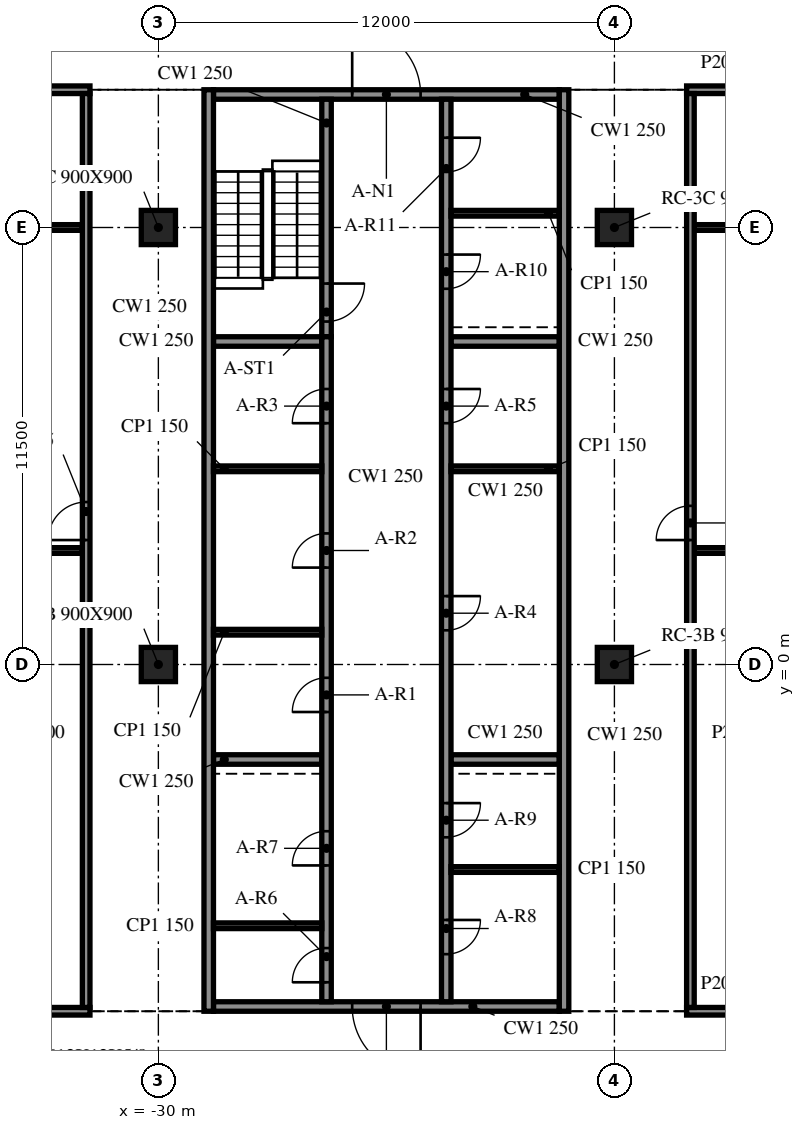
"""IFC4 building model, lengths in metres.
Left out: names, types, materials, properties, quantities, classifications, styles, units other than length and angle.
Written with IfcOpenShell. Run it as: python <this file> out.ifc"""

import sys

from ifc_helpers import new_model, si_unit, direction, frame, frame_2d, origin, origin_2d, place, context, subcontext, project, spatial, rectangle, extrude, element, fill, save


model = new_model("IFC4")
c1 = context("Model", 3, precision=1e-05, world=origin(), true_north=direction((0.0, 1.0)))
c2 = subcontext(c1, "Body", "Model", "MODEL_VIEW")
j1 = project(units=[si_unit("LENGTHUNIT", "METRE"), si_unit("PLANEANGLEUNIT", "RADIAN")], contexts=[c1])
p1 = place(None, origin())
s1 = spatial("IfcSite", under=j1, at=p1, CompositionType="ELEMENT")
p2 = place(p1, origin())
s2 = spatial("IfcBuilding", under=s1, at=p2, CompositionType="ELEMENT")
p3 = place(p2, frame((0.0, 0.0, 267.1)))
s3 = spatial("IfcBuildingStorey", under=s2, at=p3, CompositionType="ELEMENT", Elevation=267.1)
for number, where, z_axis, x_axis in (
    (1, (-30.0, 0.0, -0.34), (0.0, 0.0, 1.0), (1.0, 0.0, 0.0)),
    (2, (-30.0, 11.5, -0.34), (0.0, 0.0, 1.0), (1.0, 0.0, 0.0)),
    (3, (-18.0, 0.0, -0.34), (0.0, 0.0, 1.0), (1.0, 0.0, 0.0)),
    (4, (-18.0, 11.5, -0.34), (0.0, 0.0, 1.0), (1.0, 0.0, 0.0)),
):
    element("IfcColumn", number, at=place(p3, frame(where, z_axis=z_axis, x_axis=x_axis)), inside=s3, PredefinedType="COLUMN", context=c2, shape_type="SweptSolid", body=[
        extrude(rectangle(XDim=0.9, YDim=0.9, at=origin_2d()), origin(), (0.0, 0.0, 1.0), 3.8),
    ])
for number, where, z_axis, x_axis in (
    (5, (-28.675, 15.125, 0.0), (0.0, 0.0, 1.0), (0.0, -1.0, 0.0)),
    (6, (-19.325, -9.125, 0.0), (0.0, 0.0, 1.0), (0.0, 1.0, 0.0)),
):
    element("IfcWall", number, at=place(p3, frame(where, z_axis=z_axis, x_axis=x_axis)), inside=s3, PredefinedType="SOLIDWALL", context=c2, shape_type="SweptSolid", body=[
        extrude(rectangle(XDim=24.25, YDim=0.25, at=frame_2d((12.125, 0.0))), origin(), (0.0, 0.0, 1.0), 3.46),
    ])
p4 = place(p3, frame((-19.45, -9.0, 0.0), z_axis=(0.0, 0.0, 1.0), x_axis=(-1.0, 0.0, 0.0)))
e7 = element("IfcWall", 7, at=p4, inside=s3, PredefinedType="SOLIDWALL", context=c2, shape_type="SweptSolid", body=[
    extrude(rectangle(XDim=9.1, YDim=0.25, at=frame_2d((4.55, 0.0))), origin(), (0.0, 0.0, 1.0), 3.46),
])
p5 = place(p4, frame((3.65, 0.0, 0.0)))
e8 = element("IfcOpeningElement", 8, at=p5, cuts=e7, PredefinedType="OPENING", context=c2, shape_type="SweptSolid", body=[
    extrude(rectangle(XDim=1.8, YDim=2.1, at=frame_2d((0.9, 1.05))), frame((0.0, 0.135, 0.0), z_axis=(0.0, -1.0, 0.0), x_axis=(1.0, 0.0, 0.0)), (0.0, 0.0, 1.0), 0.27),
])
p6 = place(p3, frame((-28.55, 15.0, 0.0), z_axis=(0.0, 0.0, 1.0), x_axis=(1.0, 0.0, 0.0)))
e9 = element("IfcWall", 9, at=p6, inside=s3, PredefinedType="SOLIDWALL", context=c2, shape_type="SweptSolid", body=[
    extrude(rectangle(XDim=9.1, YDim=0.25, at=frame_2d((4.55, 0.0))), origin(), (0.0, 0.0, 1.0), 3.46),
])
p7 = place(p6, frame((3.65, 0.0, 0.0)))
e10 = element("IfcOpeningElement", 10, at=p7, cuts=e9, PredefinedType="OPENING", context=c2, shape_type="SweptSolid", body=[
    extrude(rectangle(XDim=1.8, YDim=2.1, at=frame_2d((0.9, 1.05))), frame((0.0, 0.135, 0.0), z_axis=(0.0, -1.0, 0.0), x_axis=(1.0, 0.0, 0.0)), (0.0, 0.0, 1.0), 0.27),
])
p8 = place(p3, frame((-25.575, -8.875, 0.0), z_axis=(0.0, 0.0, 1.0), x_axis=(0.0, 1.0, 0.0)))
e11 = element("IfcWall", 11, at=p8, inside=s3, PredefinedType="SOLIDWALL", context=c2, shape_type="SweptSolid", body=[
    extrude(rectangle(XDim=17.5, YDim=0.25, at=frame_2d((8.75, 0.0))), origin(), (0.0, 0.0, 1.0), 3.46),
])
p9 = place(p8, frame((7.625, 0.0, 0.0)))
e12 = element("IfcOpeningElement", 12, at=p9, cuts=e11, PredefinedType="OPENING", context=c2, shape_type="SweptSolid", body=[
    extrude(rectangle(XDim=0.9, YDim=2.1, at=frame_2d((0.45, 1.05))), frame((0.0, 0.135, 0.0), z_axis=(0.0, -1.0, 0.0), x_axis=(1.0, 0.0, 0.0)), (0.0, 0.0, 1.0), 0.27),
])
p10 = place(p8, frame((11.425, 0.0, 0.0)))
e13 = element("IfcOpeningElement", 13, at=p10, cuts=e11, PredefinedType="OPENING", context=c2, shape_type="SweptSolid", body=[
    extrude(rectangle(XDim=0.9, YDim=2.1, at=frame_2d((0.45, 1.05))), frame((0.0, 0.135, 0.0), z_axis=(0.0, -1.0, 0.0), x_axis=(1.0, 0.0, 0.0)), (0.0, 0.0, 1.0), 0.27),
])
p11 = place(p8, frame((15.225, 0.0, 0.0)))
e14 = element("IfcOpeningElement", 14, at=p11, cuts=e11, PredefinedType="OPENING", context=c2, shape_type="SweptSolid", body=[
    extrude(rectangle(XDim=0.9, YDim=2.1, at=frame_2d((0.45, 1.05))), frame((0.0, 0.135, 0.0), z_axis=(0.0, -1.0, 0.0), x_axis=(1.0, 0.0, 0.0)), (0.0, 0.0, 1.0), 0.27),
])
p12 = place(p8, frame((0.512, 0.0, 0.0)))
e15 = element("IfcOpeningElement", 15, at=p12, cuts=e11, PredefinedType="OPENING", context=c2, shape_type="SweptSolid", body=[
    extrude(rectangle(XDim=0.9, YDim=2.1, at=frame_2d((0.45, 1.05))), frame((0.0, 0.135, 0.0), z_axis=(0.0, -1.0, 0.0), x_axis=(1.0, 0.0, 0.0)), (0.0, 0.0, 1.0), 0.27),
])
p13 = place(p8, frame((3.587, 0.0, 0.0)))
e16 = element("IfcOpeningElement", 16, at=p13, cuts=e11, PredefinedType="OPENING", context=c2, shape_type="SweptSolid", body=[
    extrude(rectangle(XDim=0.9, YDim=2.1, at=frame_2d((0.45, 1.05))), frame((0.0, 0.135, 0.0), z_axis=(0.0, -1.0, 0.0), x_axis=(1.0, 0.0, 0.0)), (0.0, 0.0, 1.0), 0.27),
])
p14 = place(p3, frame((-25.575, 14.875, 0.0), z_axis=(0.0, 0.0, 1.0), x_axis=(0.0, -1.0, 0.0)))
e17 = element("IfcWall", 17, at=p14, inside=s3, PredefinedType="SOLIDWALL", context=c2, shape_type="SweptSolid", body=[
    extrude(rectangle(XDim=6.25, YDim=0.25, at=frame_2d((3.125, 0.0))), origin(), (0.0, 0.0, 1.0), 3.46),
])
p15 = place(p14, frame((4.85, 0.0, 0.0)))
e18 = element("IfcOpeningElement", 18, at=p15, cuts=e17, PredefinedType="OPENING", context=c2, shape_type="SweptSolid", body=[
    extrude(rectangle(XDim=1.0, YDim=2.1, at=frame_2d((0.5, 1.05))), frame((0.0, 0.135, 0.0), z_axis=(0.0, -1.0, 0.0), x_axis=(1.0, 0.0, 0.0)), (0.0, 0.0, 1.0), 0.27),
])
p16 = place(p3, frame((-22.425, 14.875, 0.0), z_axis=(0.0, 0.0, 1.0), x_axis=(0.0, -1.0, 0.0)))
e19 = element("IfcWall", 19, at=p16, inside=s3, PredefinedType="SOLIDWALL", context=c2, shape_type="SweptSolid", body=[
    extrude(rectangle(XDim=23.75, YDim=0.25, at=frame_2d((11.875, 0.0))), origin(), (0.0, 0.0, 1.0), 3.46),
])
p17 = place(p16, frame((13.075, 0.0, 0.0)))
e20 = element("IfcOpeningElement", 20, at=p17, cuts=e19, PredefinedType="OPENING", context=c2, shape_type="SweptSolid", body=[
    extrude(rectangle(XDim=0.9, YDim=2.1, at=frame_2d((0.45, 1.05))), frame((0.0, 0.135, 0.0), z_axis=(0.0, -1.0, 0.0), x_axis=(1.0, 0.0, 0.0)), (0.0, 0.0, 1.0), 0.27),
])
p18 = place(p16, frame((7.625, 0.0, 0.0)))
e21 = element("IfcOpeningElement", 21, at=p18, cuts=e19, PredefinedType="OPENING", context=c2, shape_type="SweptSolid", body=[
    extrude(rectangle(XDim=0.9, YDim=2.1, at=frame_2d((0.45, 1.05))), frame((0.0, 0.135, 0.0), z_axis=(0.0, -1.0, 0.0), x_axis=(1.0, 0.0, 0.0)), (0.0, 0.0, 1.0), 0.27),
])
p19 = place(p16, frame((21.597, 0.0, 0.0)))
e22 = element("IfcOpeningElement", 22, at=p19, cuts=e19, PredefinedType="OPENING", context=c2, shape_type="SweptSolid", body=[
    extrude(rectangle(XDim=0.9, YDim=2.1, at=frame_2d((0.45, 1.05))), frame((0.0, 0.135, 0.0), z_axis=(0.0, -1.0, 0.0), x_axis=(1.0, 0.0, 0.0)), (0.0, 0.0, 1.0), 0.27),
])
p20 = place(p16, frame((18.522, 0.0, 0.0)))
e23 = element("IfcOpeningElement", 23, at=p20, cuts=e19, PredefinedType="OPENING", context=c2, shape_type="SweptSolid", body=[
    extrude(rectangle(XDim=0.9, YDim=2.1, at=frame_2d((0.45, 1.05))), frame((0.0, 0.135, 0.0), z_axis=(0.0, -1.0, 0.0), x_axis=(1.0, 0.0, 0.0)), (0.0, 0.0, 1.0), 0.27),
])
p21 = place(p16, frame((4.087, 0.0, 0.0)))
e24 = element("IfcOpeningElement", 24, at=p21, cuts=e19, PredefinedType="OPENING", context=c2, shape_type="SweptSolid", body=[
    extrude(rectangle(XDim=0.9, YDim=2.1, at=frame_2d((0.45, 1.05))), frame((0.0, 0.135, 0.0), z_axis=(0.0, -1.0, 0.0), x_axis=(1.0, 0.0, 0.0)), (0.0, 0.0, 1.0), 0.27),
])
p22 = place(p16, frame((1.012, 0.0, 0.0)))
e25 = element("IfcOpeningElement", 25, at=p22, cuts=e19, PredefinedType="OPENING", context=c2, shape_type="SweptSolid", body=[
    extrude(rectangle(XDim=0.9, YDim=2.1, at=frame_2d((0.45, 1.05))), frame((0.0, 0.135, 0.0), z_axis=(0.0, -1.0, 0.0), x_axis=(1.0, 0.0, 0.0)), (0.0, 0.0, 1.0), 0.27),
])
for number, where, z_axis, x_axis in (
    (26, (-28.55, -2.5, 0.0), (0.0, 0.0, 1.0), (1.0, 0.0, 0.0)),
    (27, (-28.55, 8.5, 0.0), (0.0, 0.0, 1.0), (1.0, 0.0, 0.0)),
    (28, (-22.3, -2.5, 0.0), (0.0, 0.0, 1.0), (1.0, 0.0, 0.0)),
    (29, (-22.3, 8.5, 0.0), (0.0, 0.0, 1.0), (1.0, 0.0, 0.0)),
):
    element("IfcWall", number, at=place(p3, frame(where, z_axis=z_axis, x_axis=x_axis)), inside=s3, PredefinedType="SOLIDWALL", context=c2, shape_type="SweptSolid", body=[
        extrude(rectangle(XDim=2.85, YDim=0.25, at=frame_2d((1.425, 0.0))), origin(), (0.0, 0.0, 1.0), 3.46),
    ])
for number, where, z_axis, x_axis in (
    (30, (-28.55, 0.85, 0.0), (0.0, 0.0, 1.0), (1.0, 0.0, 0.0)),
    (31, (-28.55, 5.15, 0.0), (0.0, 0.0, 1.0), (1.0, 0.0, 0.0)),
    (32, (-22.3, 5.15, 0.0), (0.0, 0.0, 1.0), (1.0, 0.0, 0.0)),
    (33, (-28.55, -6.875, 0.0), (0.0, 0.0, 1.0), (1.0, 0.0, 0.0)),
    (34, (-22.3, -5.395, 0.0), (0.0, 0.0, 1.0), (1.0, 0.0, 0.0)),
    (35, (-22.3, 11.875, 0.0), (0.0, 0.0, 1.0), (1.0, 0.0, 0.0)),
):
    element("IfcWall", number, at=place(p3, frame(where, z_axis=z_axis, x_axis=x_axis)), inside=s3, PredefinedType="PARTITIONING", context=c2, shape_type="SweptSolid", body=[
        extrude(rectangle(XDim=2.85, YDim=0.15, at=frame_2d((1.425, 0.0))), origin(), (0.0, 0.0, 1.0), 3.46),
    ])
p23 = place(p3, frame((-47.574, -9.125, 0.0), z_axis=(0.0, 0.0, 1.0), x_axis=(1.0, 0.0, 0.0)))
e36 = element("IfcWall", 36, at=p23, inside=s3, PredefinedType="PARTITIONING", context=c2, shape_type="SweptSolid", body=[
    extrude(rectangle(XDim=15.774, YDim=0.2, at=frame_2d((7.887, 0.0))), origin(), (0.0, 0.0, 1.0), 3.46),
])
p24 = place(p23, frame((7.3, 0.0, 0.0)))
e37 = element("IfcOpeningElement", 37, at=p24, cuts=e36, PredefinedType="OPENING", context=c2, shape_type="SweptSolid", body=[
    extrude(rectangle(XDim=1.0, YDim=2.1, at=frame_2d((0.5, 1.05))), frame((0.0, 0.11, 0.0), z_axis=(0.0, -1.0, 0.0), x_axis=(1.0, 0.0, 0.0)), (0.0, 0.0, 1.0), 0.22),
])
p25 = place(p3, frame((-16.1, -9.125, 0.0), z_axis=(0.0, 0.0, 1.0), x_axis=(1.0, 0.0, 0.0)))
e38 = element("IfcWall", 38, at=p25, inside=s3, PredefinedType="PARTITIONING", context=c2, shape_type="SweptSolid", body=[
    extrude(rectangle(XDim=8.1, YDim=0.2, at=frame_2d((4.05, 0.0))), origin(), (0.0, 0.0, 1.0), 3.46),
])
p26 = place(p25, frame((3.5, 0.0, 0.0)))
e39 = element("IfcOpeningElement", 39, at=p26, cuts=e38, PredefinedType="OPENING", context=c2, shape_type="SweptSolid", body=[
    extrude(rectangle(XDim=1.0, YDim=2.1, at=frame_2d((0.5, 1.05))), frame((0.0, 0.11, 0.0), z_axis=(0.0, -1.0, 0.0), x_axis=(1.0, 0.0, 0.0)), (0.0, 0.0, 1.0), 0.22),
])
p27 = place(p3, frame((-47.85, 3.0, 0.0), z_axis=(0.0, 0.0, 1.0), x_axis=(1.0, 0.0, 0.0)))
e40 = element("IfcWall", 40, at=p27, inside=s3, PredefinedType="PARTITIONING", context=c2, shape_type="SweptSolid", body=[
    extrude(rectangle(XDim=15.85, YDim=0.15, at=frame_2d((7.925, 0.0))), origin(), (0.0, 0.0, 1.0), 3.46),
])
p28 = place(p3, frame((-15.9, 3.0, 0.0), z_axis=(0.0, 0.0, 1.0), x_axis=(1.0, 0.0, 0.0)))
e41 = element("IfcWall", 41, at=p28, inside=s3, PredefinedType="PARTITIONING", context=c2, shape_type="SweptSolid", body=[
    extrude(rectangle(XDim=7.7, YDim=0.15, at=frame_2d((3.85, 0.0))), origin(), (0.0, 0.0, 1.0), 3.46),
])
p29 = place(p3, frame((-41.55, 11.5, 0.0), z_axis=(0.0, 0.0, 1.0), x_axis=(1.0, 0.0, 0.0)))
e42 = element("IfcWall", 42, at=p29, inside=s3, PredefinedType="PARTITIONING", context=c2, shape_type="SweptSolid", body=[
    extrude(rectangle(XDim=9.55, YDim=0.15, at=frame_2d((4.775, 0.0))), origin(), (0.0, 0.0, 1.0), 3.46),
])
p30 = place(p3, frame((-15.9, 11.5, 0.0), z_axis=(0.0, 0.0, 1.0), x_axis=(1.0, 0.0, 0.0)))
e43 = element("IfcWall", 43, at=p30, inside=s3, PredefinedType="PARTITIONING", context=c2, shape_type="SweptSolid", body=[
    extrude(rectangle(XDim=7.7, YDim=0.15, at=frame_2d((3.85, 0.0))), origin(), (0.0, 0.0, 1.0), 3.46),
])
p31 = place(p3, frame((-47.975, 15.125, 0.0), z_axis=(0.0, 0.0, 1.0), x_axis=(1.0, 0.0, 0.0)))
e44 = element("IfcWall", 44, at=p31, inside=s3, PredefinedType="PARTITIONING", context=c2, shape_type="SweptSolid", body=[
    extrude(rectangle(XDim=16.175, YDim=0.2, at=frame_2d((8.087, 0.0))), origin(), (0.0, 0.0, 1.0), 3.46),
])
p32 = place(p31, frame((7.5, 0.0, 0.0)))
e45 = element("IfcOpeningElement", 45, at=p32, cuts=e44, PredefinedType="OPENING", context=c2, shape_type="SweptSolid", body=[
    extrude(rectangle(XDim=1.0, YDim=2.1, at=frame_2d((0.5, 1.05))), frame((0.0, 0.11, 0.0), z_axis=(0.0, -1.0, 0.0), x_axis=(1.0, 0.0, 0.0)), (0.0, 0.0, 1.0), 0.22),
])
p33 = place(p3, frame((-16.1, 15.125, 0.0), z_axis=(0.0, 0.0, 1.0), x_axis=(1.0, 0.0, 0.0)))
e46 = element("IfcWall", 46, at=p33, inside=s3, PredefinedType="PARTITIONING", context=c2, shape_type="SweptSolid", body=[
    extrude(rectangle(XDim=8.1, YDim=0.2, at=frame_2d((4.05, 0.0))), origin(), (0.0, 0.0, 1.0), 3.46),
])
p34 = place(p33, frame((3.5, 0.0, 0.0)))
e47 = element("IfcOpeningElement", 47, at=p34, cuts=e46, PredefinedType="OPENING", context=c2, shape_type="SweptSolid", body=[
    extrude(rectangle(XDim=1.0, YDim=2.1, at=frame_2d((0.5, 1.05))), frame((0.0, 0.11, 0.0), z_axis=(0.0, -1.0, 0.0), x_axis=(1.0, 0.0, 0.0)), (0.0, 0.0, 1.0), 0.22),
])
p35 = place(p3, frame((-31.9, -9.025, 0.0), z_axis=(0.0, 0.0, 1.0), x_axis=(0.0, 1.0, 0.0)))
e48 = element("IfcWall", 48, at=p35, inside=s3, PredefinedType="PARTITIONING", context=c2, shape_type="SweptSolid", body=[
    extrude(rectangle(XDim=24.05, YDim=0.2, at=frame_2d((12.025, 0.0))), origin(), (0.0, 0.0, 1.0), 3.46),
])
p36 = place(p35, frame((12.3, 0.0, 0.0)))
e49 = element("IfcOpeningElement", 49, at=p36, cuts=e48, PredefinedType="OPENING", context=c2, shape_type="SweptSolid", body=[
    extrude(rectangle(XDim=1.0, YDim=2.1, at=frame_2d((0.5, 1.05))), frame((0.0, 0.11, 0.0), z_axis=(0.0, -1.0, 0.0), x_axis=(1.0, 0.0, 0.0)), (0.0, 0.0, 1.0), 0.22),
])
p37 = place(p3, frame((-16.0, -9.025, 0.0), z_axis=(0.0, 0.0, 1.0), x_axis=(0.0, 1.0, 0.0)))
e50 = element("IfcWall", 50, at=p37, inside=s3, PredefinedType="PARTITIONING", context=c2, shape_type="SweptSolid", body=[
    extrude(rectangle(XDim=24.05, YDim=0.2, at=frame_2d((12.025, 0.0))), origin(), (0.0, 0.0, 1.0), 3.46),
])
p38 = place(p37, frame((12.3, 0.0, 0.0)))
e51 = element("IfcOpeningElement", 51, at=p38, cuts=e50, PredefinedType="OPENING", context=c2, shape_type="SweptSolid", body=[
    extrude(rectangle(XDim=0.9, YDim=2.1, at=frame_2d((0.45, 1.05))), frame((0.0, 0.11, 0.0), z_axis=(0.0, -1.0, 0.0), x_axis=(1.0, 0.0, 0.0)), (0.0, 0.0, 1.0), 0.22),
])
p39 = place(p5, origin())
e52 = element("IfcDoor", 52, at=p39, inside=s3, OperationType="DOUBLE_DOOR_SINGLE_SWING", PredefinedType="DOOR", context=c2, shape_type="SweptSolid", body=[
    extrude(rectangle(XDim=1.8, YDim=2.1, at=frame_2d((0.9, 1.05))), frame((0.0, 0.025, 0.0), z_axis=(0.0, -1.0, 0.0), x_axis=(1.0, 0.0, 0.0)), (0.0, 0.0, 1.0), 0.05),
])
fill(e8, e52)
p40 = place(p7, origin())
e53 = element("IfcDoor", 53, at=p40, inside=s3, OperationType="DOUBLE_DOOR_SINGLE_SWING", PredefinedType="DOOR", context=c2, shape_type="SweptSolid", body=[
    extrude(rectangle(XDim=1.8, YDim=2.1, at=frame_2d((0.9, 1.05))), frame((0.0, 0.025, 0.0), z_axis=(0.0, -1.0, 0.0), x_axis=(1.0, 0.0, 0.0)), (0.0, 0.0, 1.0), 0.05),
])
fill(e10, e53)
p41 = place(p9, origin())
e54 = element("IfcDoor", 54, at=p41, inside=s3, OperationType="SINGLE_SWING_LEFT", PredefinedType="DOOR", context=c2, shape_type="SweptSolid", body=[
    extrude(rectangle(XDim=0.9, YDim=2.1, at=frame_2d((0.45, 1.05))), frame((0.0, 0.025, 0.0), z_axis=(0.0, -1.0, 0.0), x_axis=(1.0, 0.0, 0.0)), (0.0, 0.0, 1.0), 0.05),
])
fill(e12, e54)
p42 = place(p10, origin())
e55 = element("IfcDoor", 55, at=p42, inside=s3, OperationType="SINGLE_SWING_RIGHT", PredefinedType="DOOR", context=c2, shape_type="SweptSolid", body=[
    extrude(rectangle(XDim=0.9, YDim=2.1, at=frame_2d((0.45, 1.05))), frame((0.0, 0.025, 0.0), z_axis=(0.0, -1.0, 0.0), x_axis=(1.0, 0.0, 0.0)), (0.0, 0.0, 1.0), 0.05),
])
fill(e13, e55)
p43 = place(p11, origin())
e56 = element("IfcDoor", 56, at=p43, inside=s3, OperationType="SINGLE_SWING_LEFT", PredefinedType="DOOR", context=c2, shape_type="SweptSolid", body=[
    extrude(rectangle(XDim=0.9, YDim=2.1, at=frame_2d((0.45, 1.05))), frame((0.0, 0.025, 0.0), z_axis=(0.0, -1.0, 0.0), x_axis=(1.0, 0.0, 0.0)), (0.0, 0.0, 1.0), 0.05),
])
fill(e14, e56)
p44 = place(p17, origin())
e57 = element("IfcDoor", 57, at=p44, inside=s3, OperationType="SINGLE_SWING_RIGHT", PredefinedType="DOOR", context=c2, shape_type="SweptSolid", body=[
    extrude(rectangle(XDim=0.9, YDim=2.1, at=frame_2d((0.45, 1.05))), frame((0.0, 0.025, 0.0), z_axis=(0.0, -1.0, 0.0), x_axis=(1.0, 0.0, 0.0)), (0.0, 0.0, 1.0), 0.05),
])
fill(e20, e57)
p45 = place(p18, origin())
e58 = element("IfcDoor", 58, at=p45, inside=s3, OperationType="SINGLE_SWING_LEFT", PredefinedType="DOOR", context=c2, shape_type="SweptSolid", body=[
    extrude(rectangle(XDim=0.9, YDim=2.1, at=frame_2d((0.45, 1.05))), frame((0.0, 0.025, 0.0), z_axis=(0.0, -1.0, 0.0), x_axis=(1.0, 0.0, 0.0)), (0.0, 0.0, 1.0), 0.05),
])
fill(e21, e58)
p46 = place(p12, origin())
e59 = element("IfcDoor", 59, at=p46, inside=s3, OperationType="SINGLE_SWING_RIGHT", PredefinedType="DOOR", context=c2, shape_type="SweptSolid", body=[
    extrude(rectangle(XDim=0.9, YDim=2.1, at=frame_2d((0.45, 1.05))), frame((0.0, 0.025, 0.0), z_axis=(0.0, -1.0, 0.0), x_axis=(1.0, 0.0, 0.0)), (0.0, 0.0, 1.0), 0.05),
])
fill(e15, e59)
p47 = place(p13, origin())
e60 = element("IfcDoor", 60, at=p47, inside=s3, OperationType="SINGLE_SWING_LEFT", PredefinedType="DOOR", context=c2, shape_type="SweptSolid", body=[
    extrude(rectangle(XDim=0.9, YDim=2.1, at=frame_2d((0.45, 1.05))), frame((0.0, 0.025, 0.0), z_axis=(0.0, -1.0, 0.0), x_axis=(1.0, 0.0, 0.0)), (0.0, 0.0, 1.0), 0.05),
])
fill(e16, e60)
p48 = place(p19, origin())
e61 = element("IfcDoor", 61, at=p48, inside=s3, OperationType="SINGLE_SWING_RIGHT", PredefinedType="DOOR", context=c2, shape_type="SweptSolid", body=[
    extrude(rectangle(XDim=0.9, YDim=2.1, at=frame_2d((0.45, 1.05))), frame((0.0, 0.025, 0.0), z_axis=(0.0, -1.0, 0.0), x_axis=(1.0, 0.0, 0.0)), (0.0, 0.0, 1.0), 0.05),
])
fill(e22, e61)
p49 = place(p20, origin())
e62 = element("IfcDoor", 62, at=p49, inside=s3, OperationType="SINGLE_SWING_LEFT", PredefinedType="DOOR", context=c2, shape_type="SweptSolid", body=[
    extrude(rectangle(XDim=0.9, YDim=2.1, at=frame_2d((0.45, 1.05))), frame((0.0, 0.025, 0.0), z_axis=(0.0, -1.0, 0.0), x_axis=(1.0, 0.0, 0.0)), (0.0, 0.0, 1.0), 0.05),
])
fill(e23, e62)
p50 = place(p21, origin())
e63 = element("IfcDoor", 63, at=p50, inside=s3, OperationType="SINGLE_SWING_RIGHT", PredefinedType="DOOR", context=c2, shape_type="SweptSolid", body=[
    extrude(rectangle(XDim=0.9, YDim=2.1, at=frame_2d((0.45, 1.05))), frame((0.0, 0.025, 0.0), z_axis=(0.0, -1.0, 0.0), x_axis=(1.0, 0.0, 0.0)), (0.0, 0.0, 1.0), 0.05),
])
fill(e24, e63)
p51 = place(p22, origin())
e64 = element("IfcDoor", 64, at=p51, inside=s3, OperationType="SINGLE_SWING_LEFT", PredefinedType="DOOR", context=c2, shape_type="SweptSolid", body=[
    extrude(rectangle(XDim=0.9, YDim=2.1, at=frame_2d((0.45, 1.05))), frame((0.0, 0.025, 0.0), z_axis=(0.0, -1.0, 0.0), x_axis=(1.0, 0.0, 0.0)), (0.0, 0.0, 1.0), 0.05),
])
fill(e25, e64)
p52 = place(p15, origin())
e65 = element("IfcDoor", 65, at=p52, inside=s3, OperationType="SINGLE_SWING_RIGHT", PredefinedType="DOOR", context=c2, shape_type="SweptSolid", body=[
    extrude(rectangle(XDim=1.0, YDim=2.1, at=frame_2d((0.5, 1.05))), frame((0.0, 0.025, 0.0), z_axis=(0.0, -1.0, 0.0), x_axis=(1.0, 0.0, 0.0)), (0.0, 0.0, 1.0), 0.05),
])
fill(e18, e65)
p53 = place(p36, origin())
e66 = element("IfcDoor", 66, at=p53, inside=s3, OperationType="SINGLE_SWING_RIGHT", PredefinedType="DOOR", context=c2, shape_type="SweptSolid", body=[
    extrude(rectangle(XDim=1.0, YDim=2.1, at=frame_2d((0.5, 1.05))), frame((0.0, 0.025, 0.0), z_axis=(0.0, -1.0, 0.0), x_axis=(1.0, 0.0, 0.0)), (0.0, 0.0, 1.0), 0.05),
])
fill(e49, e66)
p54 = place(p38, origin())
e67 = element("IfcDoor", 67, at=p54, inside=s3, OperationType="SINGLE_SWING_LEFT", PredefinedType="DOOR", context=c2, shape_type="SweptSolid", body=[
    extrude(rectangle(XDim=0.9, YDim=2.1, at=frame_2d((0.45, 1.05))), frame((0.0, 0.025, 0.0), z_axis=(0.0, -1.0, 0.0), x_axis=(1.0, 0.0, 0.0)), (0.0, 0.0, 1.0), 0.05),
])
fill(e51, e67)
save(model, sys.argv[1])
